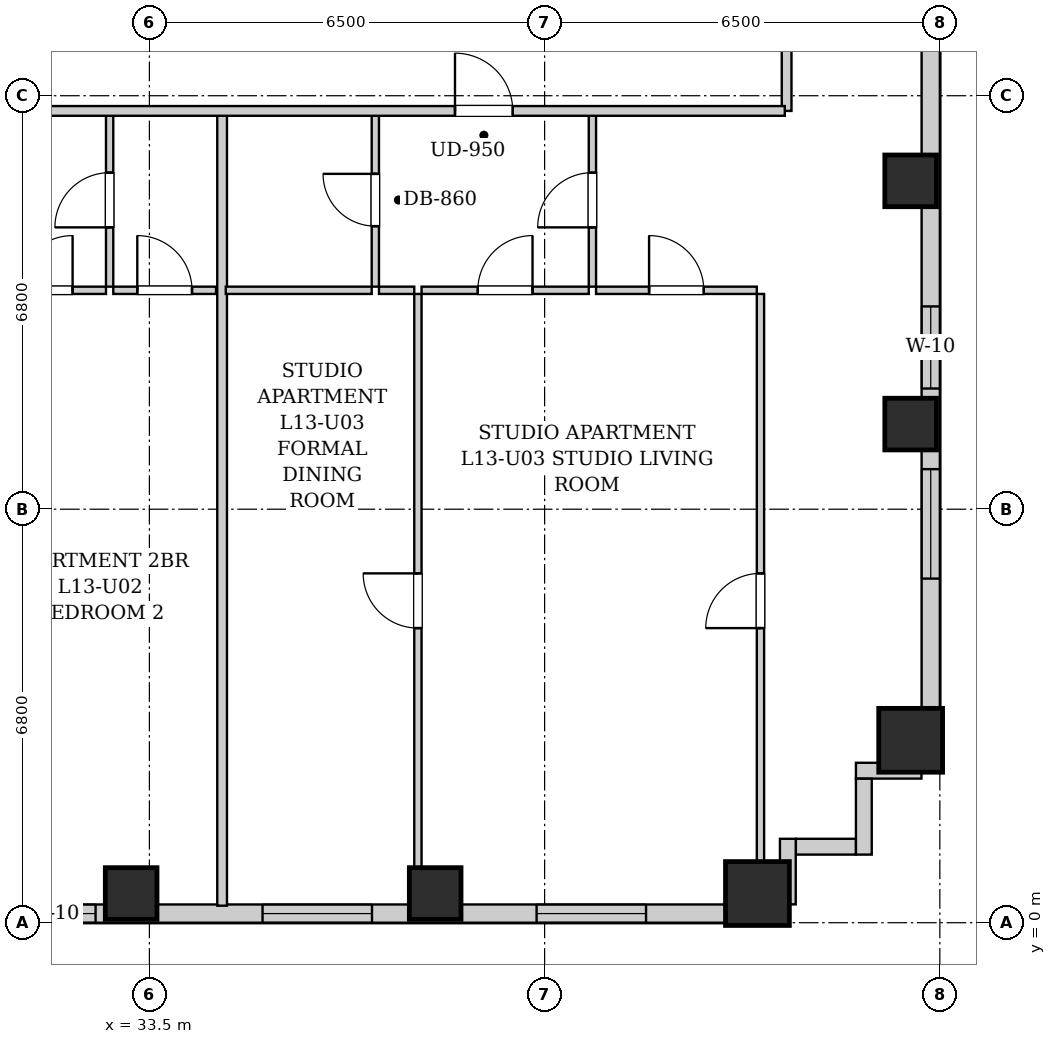
"""IFC4 building model, lengths in metres.
Left out: names, types, materials, properties, quantities, classifications, styles, units other than length and angle.
Written with IfcOpenShell. Run it as: python <this file> out.ifc"""

import sys

from ifc_helpers import new_model, si_unit, direction, frame, frame_2d, origin, origin_2d, place, context, subcontext, project, spatial, rectangle, extrude, element, fill, save


model = new_model("IFC4")
c1 = context("Model", 3, precision=1e-05, world=origin(), true_north=direction((0.0, 1.0)))
c2 = subcontext(c1, "Body", "Model", "MODEL_VIEW")
j1 = project(units=[si_unit("LENGTHUNIT", "METRE"), si_unit("PLANEANGLEUNIT", "RADIAN")], contexts=[c1])
p1 = place(None, origin())
s1 = spatial("IfcSite", under=j1, at=p1, CompositionType="ELEMENT")
p2 = place(p1, origin())
s2 = spatial("IfcBuilding", under=s1, at=p2, CompositionType="ELEMENT")
p3 = place(p2, frame((0.0, 0.0, 51.4)))
s3 = spatial("IfcBuildingStorey", under=s2, at=p3, CompositionType="ELEMENT", Elevation=51.4)
for number, where, z_axis, x_axis in (
    (1, (33.2, 0.48, 0.0), (0.0, 0.0, 1.0), (1.0, 0.0, 0.0)),
    (2, (38.2, 0.48, 0.0), (0.0, 0.0, 1.0), (1.0, 0.0, 0.0)),
):
    element("IfcColumn", number, at=place(p3, frame(where, z_axis=z_axis, x_axis=x_axis)), inside=s3, PredefinedType="COLUMN", context=c2, shape_type="SweptSolid", body=[
        extrude(rectangle(XDim=0.85, YDim=0.85, at=origin_2d()), origin(), (0.0, 0.0, 1.0), 3.2),
    ])
for number, where, z_axis, x_axis in (
    (3, (43.5, 0.48, 0.0), (0.0, 0.0, 1.0), (1.0, 0.0, 0.0)),
    (4, (46.02, 3.0, 0.0), (0.0, 0.0, 1.0), (1.0, 0.0, 0.0)),
):
    element("IfcColumn", number, at=place(p3, frame(where, z_axis=z_axis, x_axis=x_axis)), inside=s3, PredefinedType="COLUMN", context=c2, shape_type="SweptSolid", body=[
        extrude(rectangle(XDim=1.05, YDim=1.05, at=origin_2d()), origin(), (0.0, 0.0, 1.0), 3.2),
    ])
for number, where, z_axis, x_axis in (
    (5, (46.02, 8.2, 0.0), (0.0, 0.0, 1.0), (1.0, 0.0, 0.0)),
    (6, (46.02, 12.2, 0.0), (0.0, 0.0, 1.0), (1.0, 0.0, 0.0)),
):
    element("IfcColumn", number, at=place(p3, frame(where, z_axis=z_axis, x_axis=x_axis)), inside=s3, PredefinedType="COLUMN", context=c2, shape_type="SweptSolid", body=[
        extrude(rectangle(XDim=0.85, YDim=0.85, at=origin_2d()), origin(), (0.0, 0.0, 1.0), 3.2),
    ])
p4 = place(p3, frame((46.35, 24.6, 0.0), z_axis=(0.0, 0.0, 1.0), x_axis=(0.0, -1.0, 0.0)))
e7 = element("IfcWall", 7, at=p4, inside=s3, PredefinedType="SOLIDWALL", context=c2, shape_type="SweptSolid", body=[
    extrude(rectangle(XDim=22.1, YDim=0.3, at=frame_2d((11.05, 0.0))), origin(), (0.0, 0.0, 1.0), 1.975),
])
p5 = place(p4, frame((17.141, 0.0, 0.55)))
e8 = element("IfcOpeningElement", 8, at=p5, cuts=e7, PredefinedType="OPENING", context=c2, shape_type="SweptSolid", body=[
    extrude(rectangle(XDim=1.8, YDim=1.2, at=frame_2d((0.9, 0.6))), frame((0.0, 0.16, 0.0), z_axis=(0.0, -1.0, 0.0), x_axis=(1.0, 0.0, 0.0)), (0.0, 0.0, 1.0), 0.32),
])
p6 = place(p4, frame((14.465, 0.0, 0.55)))
e9 = element("IfcOpeningElement", 9, at=p6, cuts=e7, PredefinedType="OPENING", context=c2, shape_type="SweptSolid", body=[
    extrude(rectangle(XDim=1.35, YDim=1.2, at=frame_2d((0.675, 0.6))), frame((0.0, 0.16, 0.0), z_axis=(0.0, -1.0, 0.0), x_axis=(1.0, 0.0, 0.0)), (0.0, 0.0, 1.0), 0.32),
])
p7 = place(p4, frame((5.1, 0.0, 0.55)))
e10 = element("IfcOpeningElement", 10, at=p7, cuts=e7, PredefinedType="OPENING", context=c2, shape_type="SweptSolid", body=[
    extrude(rectangle(XDim=1.8, YDim=1.2, at=frame_2d((0.9, 0.6))), frame((0.0, 0.16, 0.0), z_axis=(0.0, -1.0, 0.0), x_axis=(1.0, 0.0, 0.0)), (0.0, 0.0, 1.0), 0.32),
])
p8 = place(p4, frame((7.16, 0.0, 0.55)))
e11 = element("IfcOpeningElement", 11, at=p8, cuts=e7, PredefinedType="OPENING", context=c2, shape_type="SweptSolid", body=[
    extrude(rectangle(XDim=1.35, YDim=1.2, at=frame_2d((0.675, 0.6))), frame((0.0, 0.16, 0.0), z_axis=(0.0, -1.0, 0.0), x_axis=(1.0, 0.0, 0.0)), (0.0, 0.0, 1.0), 0.32),
])
p9 = place(p3, frame((44.0, 0.15, 0.0), z_axis=(0.0, 0.0, 1.0), x_axis=(-1.0, 0.0, 0.0)))
e12 = element("IfcWall", 12, at=p9, inside=s3, PredefinedType="SOLIDWALL", context=c2, shape_type="SweptSolid", body=[
    extrude(rectangle(XDim=26.15, YDim=0.3, at=frame_2d((13.075, 0.0))), origin(), (0.0, 0.0, 1.0), 1.975),
])
p10 = place(p9, frame((22.47, 0.0, 0.55)))
e13 = element("IfcOpeningElement", 13, at=p10, cuts=e12, PredefinedType="OPENING", context=c2, shape_type="SweptSolid", body=[
    extrude(rectangle(XDim=1.8, YDim=1.2, at=frame_2d((0.9, 0.6))), frame((0.0, 0.16, 0.0), z_axis=(0.0, -1.0, 0.0), x_axis=(1.0, 0.0, 0.0)), (0.0, 0.0, 1.0), 0.32),
])
p11 = place(p9, frame((14.354, 0.0, 0.55)))
e14 = element("IfcOpeningElement", 14, at=p11, cuts=e12, PredefinedType="OPENING", context=c2, shape_type="SweptSolid", body=[
    extrude(rectangle(XDim=1.8, YDim=1.2, at=frame_2d((0.9, 0.6))), frame((0.0, 0.16, 0.0), z_axis=(0.0, -1.0, 0.0), x_axis=(1.0, 0.0, 0.0)), (0.0, 0.0, 1.0), 0.32),
])
p12 = place(p9, frame((11.385, 0.0, 0.55)))
e15 = element("IfcOpeningElement", 15, at=p12, cuts=e12, PredefinedType="OPENING", context=c2, shape_type="SweptSolid", body=[
    extrude(rectangle(XDim=1.35, YDim=1.2, at=frame_2d((0.675, 0.6))), frame((0.0, 0.16, 0.0), z_axis=(0.0, -1.0, 0.0), x_axis=(1.0, 0.0, 0.0)), (0.0, 0.0, 1.0), 0.32),
])
p13 = place(p9, frame((6.839, 0.0, 0.55)))
e16 = element("IfcOpeningElement", 16, at=p13, cuts=e12, PredefinedType="OPENING", context=c2, shape_type="SweptSolid", body=[
    extrude(rectangle(XDim=1.8, YDim=1.2, at=frame_2d((0.9, 0.6))), frame((0.0, 0.16, 0.0), z_axis=(0.0, -1.0, 0.0), x_axis=(1.0, 0.0, 0.0)), (0.0, 0.0, 1.0), 0.32),
])
p14 = place(p9, frame((2.332, 0.0, 0.55)))
e17 = element("IfcOpeningElement", 17, at=p14, cuts=e12, PredefinedType="OPENING", context=c2, shape_type="SweptSolid", body=[
    extrude(rectangle(XDim=1.8, YDim=1.2, at=frame_2d((0.9, 0.6))), frame((0.0, 0.16, 0.0), z_axis=(0.0, -1.0, 0.0), x_axis=(1.0, 0.0, 0.0)), (0.0, 0.0, 1.0), 0.32),
])
p15 = place(p3, frame((46.198, 2.5, 0.0), z_axis=(0.0, 0.0, 1.0), x_axis=(-1.0, 0.0, 0.0)))
e18 = element("IfcWall", 18, at=p15, inside=s3, PredefinedType="SOLIDWALL", context=c2, shape_type="SweptSolid", body=[
    extrude(rectangle(XDim=1.078, YDim=0.26, at=frame_2d((0.539, 0.0))), origin(), (0.0, 0.0, 1.0), 2.94),
])
p16 = place(p3, frame((45.25, 2.368, 0.0), z_axis=(0.0, 0.0, 1.0), x_axis=(0.0, -1.0, 0.0)))
e19 = element("IfcWall", 19, at=p16, inside=s3, PredefinedType="SOLIDWALL", context=c2, shape_type="SweptSolid", body=[
    extrude(rectangle(XDim=1.248, YDim=0.26, at=frame_2d((0.624, 0.0))), origin(), (0.0, 0.0, 1.0), 2.94),
])
p17 = place(p3, frame((45.118, 1.25, 0.0), z_axis=(0.0, 0.0, 1.0), x_axis=(-1.0, 0.0, 0.0)))
e20 = element("IfcWall", 20, at=p17, inside=s3, PredefinedType="SOLIDWALL", context=c2, shape_type="SweptSolid", body=[
    extrude(rectangle(XDim=0.986, YDim=0.26, at=frame_2d((0.493, 0.0))), origin(), (0.0, 0.0, 1.0), 2.94),
])
p18 = place(p3, frame((44.0, 1.38, 0.0), z_axis=(0.0, 0.0, 1.0), x_axis=(0.0, -1.0, 0.0)))
e21 = element("IfcWall", 21, at=p18, inside=s3, PredefinedType="SOLIDWALL", context=c2, shape_type="SweptSolid", body=[
    extrude(rectangle(XDim=1.078, YDim=0.26, at=frame_2d((0.539, 0.0))), origin(), (0.0, 0.0, 1.0), 2.94),
])
p19 = place(p3, frame((43.98, 13.35, 0.0), z_axis=(0.0, 0.0, 1.0), x_axis=(0.0, 1.0, 0.0)))
e22 = element("IfcWall", 22, at=p19, inside=s3, PredefinedType="PARTITIONING", context=c2, shape_type="SweptSolid", body=[
    extrude(rectangle(XDim=1.74, YDim=0.16, at=frame_2d((0.87, 0.0))), origin(), (0.0, 0.0, 1.0), 2.94),
])
p20 = place(p3, frame((32.846, 10.46, 0.0), z_axis=(0.0, 0.0, 1.0), x_axis=(0.0, 1.0, 0.0)))
e23 = element("IfcWall", 23, at=p20, inside=s3, PredefinedType="PARTITIONING", context=c2, shape_type="SweptSolid", body=[
    extrude(rectangle(XDim=2.85, YDim=0.12, at=frame_2d((1.425, 0.0))), origin(), (0.0, 0.0, 1.0), 2.94),
])
p21 = place(p20, frame((0.975, 0.0, 0.0)))
e24 = element("IfcOpeningElement", 24, at=p21, cuts=e23, PredefinedType="OPENING", context=c2, shape_type="SweptSolid", body=[
    extrude(rectangle(XDim=0.9, YDim=2.05, at=frame_2d((0.45, 1.025))), frame((0.0, 0.07, 0.0), z_axis=(0.0, -1.0, 0.0), x_axis=(1.0, 0.0, 0.0)), (0.0, 0.0, 1.0), 0.14),
])
p22 = place(p3, frame((30.788, 10.4, 0.0), z_axis=(0.0, 0.0, 1.0), x_axis=(1.0, 0.0, 0.0)))
e25 = element("IfcWall", 25, at=p22, inside=s3, PredefinedType="PARTITIONING", context=c2, shape_type="SweptSolid", body=[
    extrude(rectangle(XDim=1.998, YDim=0.12, at=frame_2d((0.999, 0.0))), origin(), (0.0, 0.0, 1.0), 2.94),
])
p23 = place(p22, frame((0.549, 0.0, 0.0)))
e26 = element("IfcOpeningElement", 26, at=p23, cuts=e25, PredefinedType="OPENING", context=c2, shape_type="SweptSolid", body=[
    extrude(rectangle(XDim=0.9, YDim=2.05, at=frame_2d((0.45, 1.025))), frame((0.0, 0.07, 0.0), z_axis=(0.0, -1.0, 0.0), x_axis=(1.0, 0.0, 0.0)), (0.0, 0.0, 1.0), 0.14),
])
p24 = place(p3, frame((32.906, 10.4, 0.0), z_axis=(0.0, 0.0, 1.0), x_axis=(1.0, 0.0, 0.0)))
e27 = element("IfcWall", 27, at=p24, inside=s3, PredefinedType="PARTITIONING", context=c2, shape_type="SweptSolid", body=[
    extrude(rectangle(XDim=1.69, YDim=0.12, at=frame_2d((0.845, 0.0))), origin(), (0.0, 0.0, 1.0), 2.94),
])
p25 = place(p24, frame((0.395, 0.0, 0.0)))
e28 = element("IfcOpeningElement", 28, at=p25, cuts=e27, PredefinedType="OPENING", context=c2, shape_type="SweptSolid", body=[
    extrude(rectangle(XDim=0.9, YDim=2.05, at=frame_2d((0.45, 1.025))), frame((0.0, 0.07, 0.0), z_axis=(0.0, -1.0, 0.0), x_axis=(1.0, 0.0, 0.0)), (0.0, 0.0, 1.0), 0.14),
])
p26 = place(p3, frame((34.696, 0.28, 0.0), z_axis=(0.0, 0.0, 1.0), x_axis=(0.0, 1.0, 0.0)))
e29 = element("IfcWall", 29, at=p26, inside=s3, PredefinedType="PARTITIONING", context=c2, shape_type="SweptSolid", body=[
    extrude(rectangle(XDim=13.03, YDim=0.16, at=frame_2d((6.515, 0.0))), origin(), (0.0, 0.0, 1.0), 2.94),
])
p27 = place(p3, frame((37.216, 10.46, 0.0), z_axis=(0.0, 0.0, 1.0), x_axis=(0.0, 1.0, 0.0)))
e30 = element("IfcWall", 30, at=p27, inside=s3, PredefinedType="PARTITIONING", context=c2, shape_type="SweptSolid", body=[
    extrude(rectangle(XDim=2.85, YDim=0.12, at=frame_2d((1.425, 0.0))), origin(), (0.0, 0.0, 1.0), 2.94),
])
p28 = place(p27, frame((0.995, 0.0, 0.0)))
e31 = element("IfcOpeningElement", 31, at=p28, cuts=e30, PredefinedType="OPENING", context=c2, shape_type="SweptSolid", body=[
    extrude(rectangle(XDim=0.86, YDim=2.05, at=frame_2d((0.43, 1.025))), frame((0.0, 0.07, 0.0), z_axis=(0.0, -1.0, 0.0), x_axis=(1.0, 0.0, 0.0)), (0.0, 0.0, 1.0), 0.14),
])
p29 = place(p3, frame((34.756, 10.4, 0.0), z_axis=(0.0, 0.0, 1.0), x_axis=(1.0, 0.0, 0.0)))
e32 = element("IfcWall", 32, at=p29, inside=s3, PredefinedType="PARTITIONING", context=c2, shape_type="SweptSolid", body=[
    extrude(rectangle(XDim=2.4, YDim=0.12, at=frame_2d((1.2, 0.0))), origin(), (0.0, 0.0, 1.0), 2.94),
])
p30 = place(p3, frame((40.786, 10.46, 0.0), z_axis=(0.0, 0.0, 1.0), x_axis=(0.0, 1.0, 0.0)))
e33 = element("IfcWall", 33, at=p30, inside=s3, PredefinedType="PARTITIONING", context=c2, shape_type="SweptSolid", body=[
    extrude(rectangle(XDim=2.85, YDim=0.12, at=frame_2d((1.425, 0.0))), origin(), (0.0, 0.0, 1.0), 2.94),
])
p31 = place(p30, frame((0.975, 0.0, 0.0)))
e34 = element("IfcOpeningElement", 34, at=p31, cuts=e33, PredefinedType="OPENING", context=c2, shape_type="SweptSolid", body=[
    extrude(rectangle(XDim=0.9, YDim=2.05, at=frame_2d((0.45, 1.025))), frame((0.0, 0.07, 0.0), z_axis=(0.0, -1.0, 0.0), x_axis=(1.0, 0.0, 0.0)), (0.0, 0.0, 1.0), 0.14),
])
p32 = place(p3, frame((37.276, 10.4, 0.0), z_axis=(0.0, 0.0, 1.0), x_axis=(1.0, 0.0, 0.0)))
e35 = element("IfcWall", 35, at=p32, inside=s3, PredefinedType="PARTITIONING", context=c2, shape_type="SweptSolid", body=[
    extrude(rectangle(XDim=0.58, YDim=0.12, at=frame_2d((0.29, 0.0))), origin(), (0.0, 0.0, 1.0), 2.94),
])
p33 = place(p3, frame((37.976, 10.4, 0.0), z_axis=(0.0, 0.0, 1.0), x_axis=(1.0, 0.0, 0.0)))
e36 = element("IfcWall", 36, at=p33, inside=s3, PredefinedType="PARTITIONING", context=c2, shape_type="SweptSolid", body=[
    extrude(rectangle(XDim=2.75, YDim=0.12, at=frame_2d((1.375, 0.0))), origin(), (0.0, 0.0, 1.0), 2.94),
])
p34 = place(p33, frame((0.925, 0.0, 0.0)))
e37 = element("IfcOpeningElement", 37, at=p34, cuts=e36, PredefinedType="OPENING", context=c2, shape_type="SweptSolid", body=[
    extrude(rectangle(XDim=0.9, YDim=2.05, at=frame_2d((0.45, 1.025))), frame((0.0, 0.07, 0.0), z_axis=(0.0, -1.0, 0.0), x_axis=(1.0, 0.0, 0.0)), (0.0, 0.0, 1.0), 0.14),
])
p35 = place(p3, frame((40.846, 10.4, 0.0), z_axis=(0.0, 0.0, 1.0), x_axis=(1.0, 0.0, 0.0)))
e38 = element("IfcWall", 38, at=p35, inside=s3, PredefinedType="PARTITIONING", context=c2, shape_type="SweptSolid", body=[
    extrude(rectangle(XDim=2.644, YDim=0.12, at=frame_2d((1.322, 0.0))), origin(), (0.0, 0.0, 1.0), 2.94),
])
p36 = place(p35, frame((0.872, 0.0, 0.0)))
e39 = element("IfcOpeningElement", 39, at=p36, cuts=e38, PredefinedType="OPENING", context=c2, shape_type="SweptSolid", body=[
    extrude(rectangle(XDim=0.9, YDim=2.05, at=frame_2d((0.45, 1.025))), frame((0.0, 0.07, 0.0), z_axis=(0.0, -1.0, 0.0), x_axis=(1.0, 0.0, 0.0)), (0.0, 0.0, 1.0), 0.14),
])
p37 = place(p3, frame((37.916, 0.28, 0.0), z_axis=(0.0, 0.0, 1.0), x_axis=(0.0, 1.0, 0.0)))
e40 = element("IfcWall", 40, at=p37, inside=s3, PredefinedType="PARTITIONING", context=c2, shape_type="SweptSolid", body=[
    extrude(rectangle(XDim=10.06, YDim=0.12, at=frame_2d((5.03, 0.0))), origin(), (0.0, 0.0, 1.0), 2.94),
])
p38 = place(p37, frame((4.565, 0.0, 0.0)))
e41 = element("IfcOpeningElement", 41, at=p38, cuts=e40, PredefinedType="OPENING", context=c2, shape_type="SweptSolid", body=[
    extrude(rectangle(XDim=0.9, YDim=2.05, at=frame_2d((0.45, 1.025))), frame((0.0, 0.07, 0.0), z_axis=(0.0, -1.0, 0.0), x_axis=(1.0, 0.0, 0.0)), (0.0, 0.0, 1.0), 0.14),
])
p39 = place(p3, frame((43.55, 0.28, 0.0), z_axis=(0.0, 0.0, 1.0), x_axis=(0.0, 1.0, 0.0)))
e42 = element("IfcWall", 42, at=p39, inside=s3, PredefinedType="PARTITIONING", context=c2, shape_type="SweptSolid", body=[
    extrude(rectangle(XDim=10.06, YDim=0.12, at=frame_2d((5.03, 0.0))), origin(), (0.0, 0.0, 1.0), 2.94),
])
p40 = place(p39, frame((4.565, 0.0, 0.0)))
e43 = element("IfcOpeningElement", 43, at=p40, cuts=e42, PredefinedType="OPENING", context=c2, shape_type="SweptSolid", body=[
    extrude(rectangle(XDim=0.9, YDim=2.05, at=frame_2d((0.45, 1.025))), frame((0.0, 0.07, 0.0), z_axis=(0.0, -1.0, 0.0), x_axis=(1.0, 0.0, 0.0)), (0.0, 0.0, 1.0), 0.14),
])
p41 = place(p3, frame((10.05, 13.35, 0.0), z_axis=(0.0, 0.0, 1.0), x_axis=(1.0, 0.0, 0.0)))
e44 = element("IfcWall", 44, at=p41, inside=s3, PredefinedType="PARTITIONING", context=c2, shape_type="SweptSolid", body=[
    extrude(rectangle(XDim=33.9, YDim=0.16, at=frame_2d((16.95, 0.0))), origin(), (0.0, 0.0, 1.0), 2.94),
])
p42 = place(p41, frame((3.203, 0.0, 0.0)))
e45 = element("IfcOpeningElement", 45, at=p42, cuts=e44, PredefinedType="OPENING", context=c2, shape_type="SweptSolid", body=[
    extrude(rectangle(XDim=0.95, YDim=2.1, at=frame_2d((0.475, 1.05))), frame((0.0, 0.09, 0.0), z_axis=(0.0, -1.0, 0.0), x_axis=(1.0, 0.0, 0.0)), (0.0, 0.0, 1.0), 0.18),
])
p43 = place(p41, frame((9.39, 0.0, 0.0)))
e46 = element("IfcOpeningElement", 46, at=p43, cuts=e44, PredefinedType="OPENING", context=c2, shape_type="SweptSolid", body=[
    extrude(rectangle(XDim=0.95, YDim=2.1, at=frame_2d((0.475, 1.05))), frame((0.0, 0.09, 0.0), z_axis=(0.0, -1.0, 0.0), x_axis=(1.0, 0.0, 0.0)), (0.0, 0.0, 1.0), 0.18),
])
p44 = place(p41, frame((28.476, 0.0, 0.0)))
e47 = element("IfcOpeningElement", 47, at=p44, cuts=e44, PredefinedType="OPENING", context=c2, shape_type="SweptSolid", body=[
    extrude(rectangle(XDim=0.95, YDim=2.1, at=frame_2d((0.475, 1.05))), frame((0.0, 0.09, 0.0), z_axis=(0.0, -1.0, 0.0), x_axis=(1.0, 0.0, 0.0)), (0.0, 0.0, 1.0), 0.18),
])
p45 = place(p21, origin())
e48 = element("IfcDoor", 48, at=p45, inside=s3, OperationType="SINGLE_SWING_LEFT", PredefinedType="DOOR", context=c2, shape_type="SweptSolid", body=[
    extrude(rectangle(XDim=0.9, YDim=2.05, at=frame_2d((0.45, 1.025))), frame((0.0, 0.025, 0.0), z_axis=(0.0, -1.0, 0.0), x_axis=(1.0, 0.0, 0.0)), (0.0, 0.0, 1.0), 0.05),
])
fill(e24, e48)
p46 = place(p23, origin())
e49 = element("IfcDoor", 49, at=p46, inside=s3, OperationType="SINGLE_SWING_RIGHT", PredefinedType="DOOR", context=c2, shape_type="SweptSolid", body=[
    extrude(rectangle(XDim=0.9, YDim=2.05, at=frame_2d((0.45, 1.025))), frame((0.0, 0.025, 0.0), z_axis=(0.0, -1.0, 0.0), x_axis=(1.0, 0.0, 0.0)), (0.0, 0.0, 1.0), 0.05),
])
fill(e26, e49)
p47 = place(p25, origin())
e50 = element("IfcDoor", 50, at=p47, inside=s3, OperationType="SINGLE_SWING_LEFT", PredefinedType="DOOR", context=c2, shape_type="SweptSolid", body=[
    extrude(rectangle(XDim=0.9, YDim=2.05, at=frame_2d((0.45, 1.025))), frame((0.0, 0.025, 0.0), z_axis=(0.0, -1.0, 0.0), x_axis=(1.0, 0.0, 0.0)), (0.0, 0.0, 1.0), 0.05),
])
fill(e28, e50)
p48 = place(p28, origin())
e51 = element("IfcDoor", 51, at=p48, inside=s3, OperationType="SINGLE_SWING_RIGHT", PredefinedType="DOOR", context=c2, shape_type="SweptSolid", body=[
    extrude(rectangle(XDim=0.86, YDim=2.05, at=frame_2d((0.43, 1.025))), frame((0.0, 0.025, 0.0), z_axis=(0.0, -1.0, 0.0), x_axis=(1.0, 0.0, 0.0)), (0.0, 0.0, 1.0), 0.05),
])
fill(e31, e51)
p49 = place(p31, origin())
e52 = element("IfcDoor", 52, at=p49, inside=s3, OperationType="SINGLE_SWING_LEFT", PredefinedType="DOOR", context=c2, shape_type="SweptSolid", body=[
    extrude(rectangle(XDim=0.9, YDim=2.05, at=frame_2d((0.45, 1.025))), frame((0.0, 0.025, 0.0), z_axis=(0.0, -1.0, 0.0), x_axis=(1.0, 0.0, 0.0)), (0.0, 0.0, 1.0), 0.05),
])
fill(e34, e52)
p50 = place(p34, origin())
e53 = element("IfcDoor", 53, at=p50, inside=s3, OperationType="SINGLE_SWING_RIGHT", PredefinedType="DOOR", context=c2, shape_type="SweptSolid", body=[
    extrude(rectangle(XDim=0.9, YDim=2.05, at=frame_2d((0.45, 1.025))), frame((0.0, 0.025, 0.0), z_axis=(0.0, -1.0, 0.0), x_axis=(1.0, 0.0, 0.0)), (0.0, 0.0, 1.0), 0.05),
])
fill(e37, e53)
p51 = place(p36, origin())
e54 = element("IfcDoor", 54, at=p51, inside=s3, OperationType="SINGLE_SWING_LEFT", PredefinedType="DOOR", context=c2, shape_type="SweptSolid", body=[
    extrude(rectangle(XDim=0.9, YDim=2.05, at=frame_2d((0.45, 1.025))), frame((0.0, 0.025, 0.0), z_axis=(0.0, -1.0, 0.0), x_axis=(1.0, 0.0, 0.0)), (0.0, 0.0, 1.0), 0.05),
])
fill(e39, e54)
p52 = place(p38, origin())
e55 = element("IfcDoor", 55, at=p52, inside=s3, OperationType="SINGLE_SWING_RIGHT", PredefinedType="DOOR", context=c2, shape_type="SweptSolid", body=[
    extrude(rectangle(XDim=0.9, YDim=2.05, at=frame_2d((0.45, 1.025))), frame((0.0, 0.025, 0.0), z_axis=(0.0, -1.0, 0.0), x_axis=(1.0, 0.0, 0.0)), (0.0, 0.0, 1.0), 0.05),
])
fill(e41, e55)
p53 = place(p40, origin())
e56 = element("IfcDoor", 56, at=p53, inside=s3, OperationType="SINGLE_SWING_LEFT", PredefinedType="DOOR", context=c2, shape_type="SweptSolid", body=[
    extrude(rectangle(XDim=0.9, YDim=2.05, at=frame_2d((0.45, 1.025))), frame((0.0, 0.025, 0.0), z_axis=(0.0, -1.0, 0.0), x_axis=(1.0, 0.0, 0.0)), (0.0, 0.0, 1.0), 0.05),
])
fill(e43, e56)
p54 = place(p44, origin())
e57 = element("IfcDoor", 57, at=p54, inside=s3, OperationType="SINGLE_SWING_LEFT", PredefinedType="DOOR", context=c2, shape_type="SweptSolid", body=[
    extrude(rectangle(XDim=0.95, YDim=2.1, at=frame_2d((0.475, 1.05))), frame((0.0, 0.025, 0.0), z_axis=(0.0, -1.0, 0.0), x_axis=(1.0, 0.0, 0.0)), (0.0, 0.0, 1.0), 0.05),
])
fill(e47, e57)
p55 = place(p12, origin())
e58 = element("IfcWindow", 58, at=p55, inside=s3, PartitioningType="SINGLE_PANEL", PredefinedType="WINDOW", context=c2, shape_type="SweptSolid", body=[
    extrude(rectangle(XDim=1.35, YDim=1.2, at=frame_2d((0.675, 0.6))), frame((0.0, 0.03, 0.0), z_axis=(0.0, -1.0, 0.0), x_axis=(1.0, 0.0, 0.0)), (0.0, 0.0, 1.0), 0.06),
])
fill(e15, e58)
p56 = place(p13, origin())
e59 = element("IfcWindow", 59, at=p56, inside=s3, PartitioningType="DOUBLE_PANEL_VERTICAL", PredefinedType="WINDOW", context=c2, shape_type="SweptSolid", body=[
    extrude(rectangle(XDim=1.8, YDim=1.2, at=frame_2d((0.9, 0.6))), frame((0.0, 0.03, 0.0), z_axis=(0.0, -1.0, 0.0), x_axis=(1.0, 0.0, 0.0)), (0.0, 0.0, 1.0), 0.06),
])
fill(e16, e59)
p57 = place(p14, origin())
e60 = element("IfcWindow", 60, at=p57, inside=s3, PartitioningType="DOUBLE_PANEL_VERTICAL", PredefinedType="WINDOW", context=c2, shape_type="SweptSolid", body=[
    extrude(rectangle(XDim=1.8, YDim=1.2, at=frame_2d((0.9, 0.6))), frame((0.0, 0.03, 0.0), z_axis=(0.0, -1.0, 0.0), x_axis=(1.0, 0.0, 0.0)), (0.0, 0.0, 1.0), 0.06),
])
fill(e17, e60)
p58 = place(p5, origin())
e61 = element("IfcWindow", 61, at=p58, inside=s3, PartitioningType="DOUBLE_PANEL_VERTICAL", PredefinedType="WINDOW", context=c2, shape_type="SweptSolid", body=[
    extrude(rectangle(XDim=1.8, YDim=1.2, at=frame_2d((0.9, 0.6))), frame((0.0, 0.03, 0.0), z_axis=(0.0, -1.0, 0.0), x_axis=(1.0, 0.0, 0.0)), (0.0, 0.0, 1.0), 0.06),
])
fill(e8, e61)
p59 = place(p6, origin())
e62 = element("IfcWindow", 62, at=p59, inside=s3, PartitioningType="SINGLE_PANEL", PredefinedType="WINDOW", context=c2, shape_type="SweptSolid", body=[
    extrude(rectangle(XDim=1.35, YDim=1.2, at=frame_2d((0.675, 0.6))), frame((0.0, 0.03, 0.0), z_axis=(0.0, -1.0, 0.0), x_axis=(1.0, 0.0, 0.0)), (0.0, 0.0, 1.0), 0.06),
])
fill(e9, e62)
save(model, sys.argv[1])
